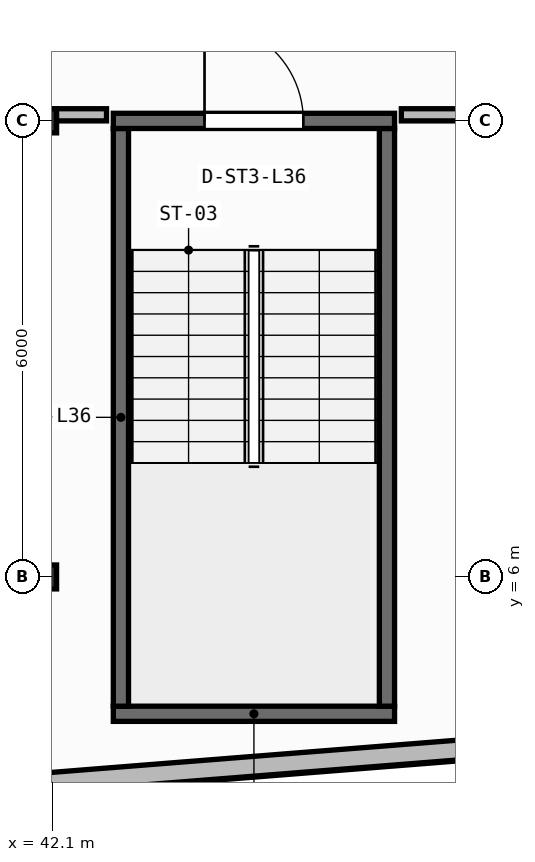
"""IFC4 building model, lengths in metres.
Left out: names, types, materials, properties, quantities, classifications, styles, units other than length and angle.
Written with IfcOpenShell. Run it as: python <this file> out.ifc"""

import sys

from ifc_helpers import new_model, si_unit, direction, frame, frame_2d, origin, origin_2d, place, context, subcontext, project, spatial, rectangle, i_section, extrude, element, fill, save


model = new_model("IFC4")
c1 = context("Model", 3, precision=1e-05, world=origin(), true_north=direction((0.0, 1.0)))
c2 = subcontext(c1, "Body", "Model", "MODEL_VIEW")
j1 = project(units=[si_unit("LENGTHUNIT", "METRE"), si_unit("PLANEANGLEUNIT", "RADIAN")], contexts=[c1])
p1 = place(None, origin())
s1 = spatial("IfcSite", under=j1, at=p1, CompositionType="ELEMENT")
p2 = place(p1, origin())
s2 = spatial("IfcBuilding", under=s1, at=p2, CompositionType="ELEMENT")
p3 = place(p2, frame((0.0, 0.0, 146.8)))
s3 = spatial("IfcBuildingStorey", under=s2, at=p3, CompositionType="ELEMENT", Elevation=146.8)
for number, where, z_axis, x_axis in (
    (1, (42.0, 6.0, 0.0), (0.0, 0.0, 1.0), (1.0, 0.0, 0.0)),
    (2, (42.0, 12.0, 0.0), (0.0, 0.0, 1.0), (1.0, 0.0, 0.0)),
):
    element("IfcColumn", number, at=place(p3, frame(where, z_axis=z_axis, x_axis=x_axis)), inside=s3, PredefinedType="COLUMN", context=c2, shape_type="SweptSolid", body=[
        extrude(i_section(OverallWidth=0.307, OverallDepth=0.315, WebThickness=0.012, FlangeThickness=0.019, FilletRadius=0.017, at=origin_2d()), origin(), (0.0, 0.0, 1.0), 3.95),
    ])
p4 = place(p3, frame((2.76, 0.173, 0.0), z_axis=(0.0, 0.0, 1.0), x_axis=(0.996857931723, 0.079210251617, 0.0)))
e3 = element("IfcWall", 3, at=p4, inside=s3, PredefinedType="STANDARD", context=c2, shape_type="SweptSolid", body=[
    extrude(rectangle(XDim=51.442, YDim=0.26, at=frame_2d((25.721, 0.0))), origin(), (0.0, 0.0, 1.0), 3.71),
])
p5 = place(p4, frame((24.521, 0.0, 0.9)))
e4 = element("IfcOpeningElement", 4, at=p5, cuts=e3, PredefinedType="OPENING", context=c2, shape_type="SweptSolid", body=[
    extrude(rectangle(XDim=2.4, YDim=1.65, at=frame_2d((1.2, 0.825))), frame((0.0, 0.14, 0.0), z_axis=(0.0, -1.0, 0.0), x_axis=(1.0, 0.0, 0.0)), (0.0, 0.0, 1.0), 0.28),
])
p6 = place(p3, frame((42.9, 4.2, 0.0), z_axis=(0.0, 0.0, 1.0), x_axis=(1.0, 0.0, 0.0)))
e5 = element("IfcWall", 5, at=p6, inside=s3, PredefinedType="SHEAR", context=c2, shape_type="SweptSolid", body=[
    extrude(rectangle(XDim=3.7, YDim=0.2, at=frame_2d((1.85, 0.0))), origin(), (0.0, 0.0, 1.0), 3.71),
])
for number, where, z_axis, x_axis in (
    (6, (43.0, 4.3, 0.0), (0.0, 0.0, 1.0), (0.0, 1.0, 0.0)),
    (7, (46.5, 4.3, 0.0), (0.0, 0.0, 1.0), (0.0, 1.0, 0.0)),
):
    element("IfcWall", number, at=place(p3, frame(where, z_axis=z_axis, x_axis=x_axis)), inside=s3, PredefinedType="SHEAR", context=c2, shape_type="SweptSolid", body=[
        extrude(rectangle(XDim=7.6, YDim=0.2, at=frame_2d((3.8, 0.0))), origin(), (0.0, 0.0, 1.0), 3.71),
    ])
p7 = place(p3, frame((42.9, 12.0, 0.0), z_axis=(0.0, 0.0, 1.0), x_axis=(1.0, 0.0, 0.0)))
e8 = element("IfcWall", 8, at=p7, inside=s3, PredefinedType="SHEAR", context=c2, shape_type="SweptSolid", body=[
    extrude(rectangle(XDim=3.7, YDim=0.2, at=frame_2d((1.85, 0.0))), origin(), (0.0, 0.0, 1.0), 3.71),
])
p8 = place(p7, frame((1.2, 0.0, 0.0)))
e9 = element("IfcOpeningElement", 9, at=p8, cuts=e8, PredefinedType="OPENING", context=c2, shape_type="SweptSolid", body=[
    extrude(rectangle(XDim=1.3, YDim=2.15, at=frame_2d((0.65, 1.075))), frame((0.0, 0.11, 0.0), z_axis=(0.0, -1.0, 0.0), x_axis=(1.0, 0.0, 0.0)), (0.0, 0.0, 1.0), 0.22),
])
p9 = place(p3, frame((40.03, 12.08, 0.0), z_axis=(0.0, 0.0, 1.0), x_axis=(1.0, 0.0, 0.0)))
e10 = element("IfcWall", 10, at=p9, inside=s3, PredefinedType="PARTITIONING", context=c2, shape_type="SweptSolid", body=[
    extrude(rectangle(XDim=2.781, YDim=0.16, at=frame_2d((1.39, 0.0))), origin(), (0.0, 0.0, 1.0), 3.083),
])
p10 = place(p3, frame((46.689, 12.08, 0.0), z_axis=(0.0, 0.0, 1.0), x_axis=(1.0, 0.0, 0.0)))
e11 = element("IfcWall", 11, at=p10, inside=s3, PredefinedType="PARTITIONING", context=c2, shape_type="SweptSolid", body=[
    extrude(rectangle(XDim=3.011, YDim=0.16, at=frame_2d((1.505, 0.0))), origin(), (0.0, 0.0, 1.0), 3.083),
])
p11 = place(p8, origin())
e12 = element("IfcDoor", 12, at=p11, inside=s3, OperationType="SINGLE_SWING_LEFT", PredefinedType="DOOR", context=c2, shape_type="SweptSolid", body=[
    extrude(rectangle(XDim=1.3, YDim=2.15, at=frame_2d((0.65, 1.075))), frame((0.0, 0.025, 0.0), z_axis=(0.0, -1.0, 0.0), x_axis=(1.0, 0.0, 0.0)), (0.0, 0.0, 1.0), 0.05),
])
fill(e9, e12)
save(model, sys.argv[1])
